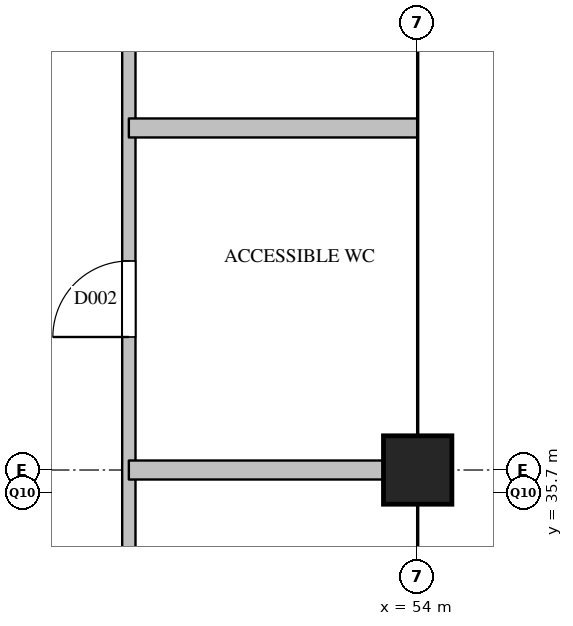
"""IFC4 building model, lengths in metres.
Left out: names, types, materials, properties, quantities, classifications, styles, units other than length and angle.
Written with IfcOpenShell. Run it as: python <this file> out.ifc"""

import sys

from ifc_helpers import new_model, si_unit, direction, frame, frame_2d, origin, origin_2d, place, context, subcontext, project, spatial, rectangle, extrude, element, fill, save


model = new_model("IFC4")
c1 = context("Model", 3, precision=1e-05, world=origin(), true_north=direction((0.0, 1.0)))
c2 = subcontext(c1, "Body", "Model", "MODEL_VIEW")
j1 = project(units=[si_unit("LENGTHUNIT", "METRE"), si_unit("PLANEANGLEUNIT", "RADIAN")], contexts=[c1])
p1 = place(None, origin())
s1 = spatial("IfcSite", under=j1, at=p1, CompositionType="ELEMENT")
p2 = place(p1, origin())
s2 = spatial("IfcBuilding", under=s1, at=p2, CompositionType="ELEMENT")
p3 = place(p2, frame((0.0, 0.0, 316.8)))
s3 = spatial("IfcBuildingStorey", under=s2, at=p3, CompositionType="ELEMENT", Elevation=316.8)
p4 = place(p3, frame((54.0, 36.0, 0.0), z_axis=(0.0, 0.0, 1.0), x_axis=(1.0, 0.0, 0.0)))
e1 = element("IfcColumn", 1, at=p4, inside=s3, PredefinedType="COLUMN", context=c2, shape_type="SweptSolid", body=[
    extrude(rectangle(XDim=0.9, YDim=0.9, at=origin_2d()), origin(), (0.0, 0.0, 1.0), 3.9),
])
p5 = place(p3, frame((50.2, 28.5, 0.0), z_axis=(0.0, 0.0, 1.0), x_axis=(0.0, 1.0, 0.0)))
e2 = element("IfcWall", 2, at=p5, inside=s3, PredefinedType="PARTITIONING", context=c2, shape_type="SweptSolid", body=[
    extrude(rectangle(XDim=23.3, YDim=0.175, at=frame_2d((11.65, 0.0))), origin(), (0.0, 0.0, 1.0), 3.6),
])
p6 = place(p5, frame((3.3, 0.0, 0.0)))
e3 = element("IfcOpeningElement", 3, at=p6, cuts=e2, PredefinedType="OPENING", context=c2, shape_type="SweptSolid", body=[
    extrude(rectangle(XDim=0.9, YDim=2.1, at=frame_2d((0.45, 1.05))), frame((0.0, 0.097, 0.0), z_axis=(0.0, -1.0, 0.0), x_axis=(1.0, 0.0, 0.0)), (0.0, 0.0, 1.0), 0.195),
])
p7 = place(p5, frame((9.25, 0.0, 0.0)))
e4 = element("IfcOpeningElement", 4, at=p7, cuts=e2, PredefinedType="OPENING", context=c2, shape_type="SweptSolid", body=[
    extrude(rectangle(XDim=1.0, YDim=2.1, at=frame_2d((0.5, 1.05))), frame((0.0, 0.097, 0.0), z_axis=(0.0, -1.0, 0.0), x_axis=(1.0, 0.0, 0.0)), (0.0, 0.0, 1.0), 0.195),
])
p8 = place(p5, frame((13.8, 0.0, 0.0)))
e5 = element("IfcOpeningElement", 5, at=p8, cuts=e2, PredefinedType="OPENING", context=c2, shape_type="SweptSolid", body=[
    extrude(rectangle(XDim=0.9, YDim=2.1, at=frame_2d((0.45, 1.05))), frame((0.0, 0.097, 0.0), z_axis=(0.0, -1.0, 0.0), x_axis=(1.0, 0.0, 0.0)), (0.0, 0.0, 1.0), 0.195),
])
p9 = place(p5, frame((19.45, 0.0, 0.0)))
e6 = element("IfcOpeningElement", 6, at=p9, cuts=e2, PredefinedType="OPENING", context=c2, shape_type="SweptSolid", body=[
    extrude(rectangle(XDim=0.9, YDim=2.1, at=frame_2d((0.45, 1.05))), frame((0.0, 0.097, 0.0), z_axis=(0.0, -1.0, 0.0), x_axis=(1.0, 0.0, 0.0)), (0.0, 0.0, 1.0), 0.195),
])
p10 = place(p3, frame((50.2, 36.0, 0.0), z_axis=(0.0, 0.0, 1.0), x_axis=(1.0, 0.0, 0.0)))
e7 = element("IfcWall", 7, at=p10, inside=s3, PredefinedType="PARTITIONING", context=c2, shape_type="SweptSolid", body=[
    extrude(rectangle(XDim=3.8, YDim=0.25, at=frame_2d((1.9, 0.0))), origin(), (0.0, 0.0, 1.0), 3.6),
])
p11 = place(p3, frame((50.2, 40.5, 0.0), z_axis=(0.0, 0.0, 1.0), x_axis=(1.0, 0.0, 0.0)))
e8 = element("IfcWall", 8, at=p11, inside=s3, PredefinedType="PARTITIONING", context=c2, shape_type="SweptSolid", body=[
    extrude(rectangle(XDim=3.8, YDim=0.25, at=frame_2d((1.9, 0.0))), origin(), (0.0, 0.0, 1.0), 2.35),
])
p12 = place(p7, origin())
e9 = element("IfcDoor", 9, at=p12, inside=s3, OperationType="SINGLE_SWING_LEFT", PredefinedType="DOOR", context=c2, shape_type="SweptSolid", body=[
    extrude(rectangle(XDim=1.0, YDim=2.1, at=frame_2d((0.5, 1.05))), frame((0.0, 0.025, 0.0), z_axis=(0.0, -1.0, 0.0), x_axis=(1.0, 0.0, 0.0)), (0.0, 0.0, 1.0), 0.05),
])
fill(e4, e9)
save(model, sys.argv[1])
